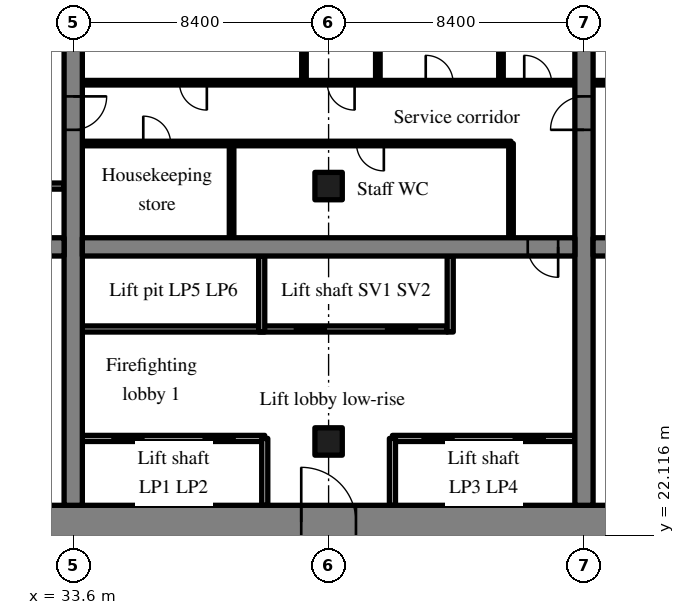
"""IFC4 building model, lengths in metres.
Left out: names, types, materials, properties, quantities, classifications, styles, units other than length and angle.
Written with IfcOpenShell. Run it as: python <this file> out.ifc"""

import sys

from ifc_helpers import new_model, si_unit, direction, frame, frame_2d, origin, origin_2d, place, context, subcontext, project, spatial, rectangle, extrude, source, transform, mapped, element, fill, save


model = new_model("IFC4")
c1 = context("Model", 3, precision=1e-05, world=origin(), true_north=direction((0.0, 1.0)))
c2 = subcontext(c1, "Body", "Model", "MODEL_VIEW")
j1 = project(units=[si_unit("LENGTHUNIT", "METRE"), si_unit("PLANEANGLEUNIT", "RADIAN")], contexts=[c1])
p1 = place(None, origin())
s1 = spatial("IfcSite", under=j1, at=p1, CompositionType="ELEMENT")
p2 = place(p1, origin())
s2 = spatial("IfcBuilding", under=s1, at=p2, CompositionType="ELEMENT")
p3 = place(p2, frame((0.0, 0.0, -4.5)))
s3 = spatial("IfcBuildingStorey", under=s2, at=p3, CompositionType="ELEMENT", Elevation=-4.5)
m1 = source(origin(), c2, "Body", "SweptSolid", [
    extrude(rectangle(XDim=50.4, YDim=1.1, at=frame_2d((25.2, 0.0))), origin(), (0.0, 0.0, 1.0), 4.22),
])
p4 = place(p3, frame((25.2, 22.55, 0.0), z_axis=(0.0, 0.0, 1.0), x_axis=(1.0, 0.0, 0.0)))
e1 = element("IfcWall", 1, at=p4, inside=s3, PredefinedType="SHEAR", context=c2, shape_type="MappedRepresentation", body=[
    mapped(m1, transform((0.0, 0.0, 0.0), scale=1.0)),
])
m2 = source(origin(), c2, "Body", "SweptSolid", [
    extrude(rectangle(XDim=1.8, YDim=2.1, at=frame_2d((0.9, 1.05))), frame((0.0, 0.56, 0.0), z_axis=(0.0, -1.0, 0.0), x_axis=(1.0, 0.0, 0.0)), (0.0, 0.0, 1.0), 1.12),
])
p5 = place(p4, frame((15.9, 0.0, 0.0)))
e2 = element("IfcOpeningElement", 2, at=p5, cuts=e1, PredefinedType="OPENING", context=c2, shape_type="MappedRepresentation", body=[
    mapped(m2, transform((0.0, 0.0, 0.0), scale=1.0)),
])
m3 = source(origin(), c2, "Body", "SweptSolid", [
    extrude(rectangle(XDim=1.2, YDim=2.1, at=frame_2d((0.6, 1.05))), frame((0.0, 0.56, 0.0), z_axis=(0.0, -1.0, 0.0), x_axis=(1.0, 0.0, 0.0)), (0.0, 0.0, 1.0), 1.12),
])
p6 = place(p4, frame((27.0, 0.0, 0.0)))
e3 = element("IfcOpeningElement", 3, at=p6, cuts=e1, PredefinedType="OPENING", context=c2, shape_type="MappedRepresentation", body=[
    mapped(m3, transform((0.0, 0.0, 0.0), scale=1.0)),
])
m4 = source(origin(), c2, "Body", "SweptSolid", [
    extrude(rectangle(XDim=0.9, YDim=2.1, at=frame_2d((0.45, 1.05))), frame((0.0, 0.56, 0.0), z_axis=(0.0, -1.0, 0.0), x_axis=(1.0, 0.0, 0.0)), (0.0, 0.0, 1.0), 1.12),
])
p7 = place(p4, frame((34.5, 0.0, 0.0)))
e4 = element("IfcOpeningElement", 4, at=p7, cuts=e1, PredefinedType="OPENING", context=c2, shape_type="MappedRepresentation", body=[
    mapped(m4, transform((0.0, 0.0, 0.0), scale=1.0)),
])
p8 = place(p4, frame((31.5, 0.0, 0.0)))
e5 = element("IfcOpeningElement", 5, at=p8, cuts=e1, PredefinedType="OPENING", context=c2, shape_type="MappedRepresentation", body=[
    mapped(m4, transform((0.0, 0.0, 0.0), scale=1.0)),
])
p9 = place(p4, frame((39.75, 0.0, 0.0)))
e6 = element("IfcOpeningElement", 6, at=p9, cuts=e1, PredefinedType="OPENING", context=c2, shape_type="MappedRepresentation", body=[
    mapped(m4, transform((0.0, 0.0, 0.0), scale=1.0)),
])
p10 = place(p4, frame((36.75, 0.0, 0.0)))
e7 = element("IfcOpeningElement", 7, at=p10, cuts=e1, PredefinedType="OPENING", context=c2, shape_type="MappedRepresentation", body=[
    mapped(m4, transform((0.0, 0.0, 0.0), scale=1.0)),
])
p11 = place(p4, frame((6.425, 0.0, 0.0)))
e8 = element("IfcOpeningElement", 8, at=p11, cuts=e1, PredefinedType="OPENING", context=c2, shape_type="MappedRepresentation", body=[
    mapped(m3, transform((0.0, 0.0, 0.0), scale=1.0)),
])
p12 = place(p4, frame((47.675, 0.0, 0.0)))
e9 = element("IfcOpeningElement", 9, at=p12, cuts=e1, PredefinedType="OPENING", context=c2, shape_type="MappedRepresentation", body=[
    mapped(m3, transform((0.0, 0.0, 0.0), scale=1.0)),
])
m5 = source(origin(), c2, "Body", "SweptSolid", [
    extrude(rectangle(XDim=17.8, YDim=0.6, at=frame_2d((8.9, 0.0))), origin(), (0.0, 0.0, 1.0), 4.22),
])
p13 = place(p3, frame((33.6, 23.1, 0.0), z_axis=(0.0, 0.0, 1.0), x_axis=(0.0, 1.0, 0.0)))
e10 = element("IfcWall", 10, at=p13, inside=s3, PredefinedType="SHEAR", context=c2, shape_type="MappedRepresentation", body=[
    mapped(m5, transform((0.0, 0.0, 0.0), scale=1.0)),
])
m6 = source(origin(), c2, "Body", "SweptSolid", [
    extrude(rectangle(XDim=1.1, YDim=2.1, at=frame_2d((0.55, 1.05))), frame((0.0, 0.31, 0.0), z_axis=(0.0, -1.0, 0.0), x_axis=(1.0, 0.0, 0.0)), (0.0, 0.0, 1.0), 0.62),
])
p14 = place(p13, frame((12.35, 0.0, 0.0)))
e11 = element("IfcOpeningElement", 11, at=p14, cuts=e10, PredefinedType="OPENING", context=c2, shape_type="MappedRepresentation", body=[
    mapped(m6, transform((0.0, 0.0, 0.0), scale=1.0)),
])
p15 = place(p3, frame((50.4, 23.1, 0.0), z_axis=(0.0, 0.0, 1.0), x_axis=(0.0, 1.0, 0.0)))
e12 = element("IfcWall", 12, at=p15, inside=s3, PredefinedType="SHEAR", context=c2, shape_type="MappedRepresentation", body=[
    mapped(m5, transform((0.0, 0.0, 0.0), scale=1.0)),
])
p16 = place(p15, frame((12.35, 0.0, 0.0)))
e13 = element("IfcOpeningElement", 13, at=p16, cuts=e12, PredefinedType="OPENING", context=c2, shape_type="MappedRepresentation", body=[
    mapped(m6, transform((0.0, 0.0, 0.0), scale=1.0)),
])
m7 = source(origin(), c2, "Body", "SweptSolid", [
    extrude(rectangle(XDim=7.0, YDim=0.6, at=frame_2d((3.5, 0.0))), origin(), (0.0, 0.0, 1.0), 4.22),
])
p17 = place(p3, frame((26.3, 31.6, 0.0), z_axis=(0.0, 0.0, 1.0), x_axis=(1.0, 0.0, 0.0)))
e14 = element("IfcWall", 14, at=p17, inside=s3, PredefinedType="SHEAR", context=c2, shape_type="MappedRepresentation", body=[
    mapped(m7, transform((0.0, 0.0, 0.0), scale=1.0)),
])
p18 = place(p17, frame((5.375, 0.0, 0.0)))
e15 = element("IfcOpeningElement", 15, at=p18, cuts=e14, PredefinedType="OPENING", context=c2, shape_type="MappedRepresentation", body=[
    mapped(m6, transform((0.0, 0.0, 0.0), scale=1.0)),
])
m8 = source(origin(), c2, "Body", "SweptSolid", [
    extrude(rectangle(XDim=16.2, YDim=0.6, at=frame_2d((8.1, 0.0))), origin(), (0.0, 0.0, 1.0), 4.22),
])
p19 = place(p3, frame((33.9, 31.6, 0.0), z_axis=(0.0, 0.0, 1.0), x_axis=(1.0, 0.0, 0.0)))
e16 = element("IfcWall", 16, at=p19, inside=s3, PredefinedType="SHEAR", context=c2, shape_type="MappedRepresentation", body=[
    mapped(m8, transform((0.0, 0.0, 0.0), scale=1.0)),
])
m9 = source(origin(), c2, "Body", "SweptSolid", [
    extrude(rectangle(XDim=1.0, YDim=2.1, at=frame_2d((0.5, 1.05))), frame((0.0, 0.31, 0.0), z_axis=(0.0, -1.0, 0.0), x_axis=(1.0, 0.0, 0.0)), (0.0, 0.0, 1.0), 0.62),
])
p20 = place(p19, frame((14.65, 0.0, 0.0)))
e17 = element("IfcOpeningElement", 17, at=p20, cuts=e16, PredefinedType="OPENING", context=c2, shape_type="MappedRepresentation", body=[
    mapped(m9, transform((0.0, 0.0, 0.0), scale=1.0)),
])
m10 = source(origin(), c2, "Body", "SweptSolid", [
    extrude(rectangle(XDim=16.2, YDim=0.6, at=frame_2d((8.1, 0.0))), origin(), (0.0, 0.0, 1.0), 4.22),
])
p21 = place(p3, frame((50.7, 31.6, 0.0), z_axis=(0.0, 0.0, 1.0), x_axis=(1.0, 0.0, 0.0)))
e18 = element("IfcWall", 18, at=p21, inside=s3, PredefinedType="SHEAR", context=c2, shape_type="MappedRepresentation", body=[
    mapped(m10, transform((0.0, 0.0, 0.0), scale=1.0)),
])
p22 = place(p21, frame((0.55, 0.0, 0.0)))
e19 = element("IfcOpeningElement", 19, at=p22, cuts=e18, PredefinedType="OPENING", context=c2, shape_type="MappedRepresentation", body=[
    mapped(m9, transform((0.0, 0.0, 0.0), scale=1.0)),
])
m11 = source(origin(), c2, "Body", "SweptSolid", [
    extrude(rectangle(XDim=0.9, YDim=0.9, at=origin_2d()), origin(), (0.0, 0.0, 1.0), 4.22),
])
for number, where, z_axis, x_axis in (
    (20, (42.0, 25.2, 0.0), (0.0, 0.0, 1.0), (1.0, 0.0, 0.0)),
    (21, (42.0, 33.6, 0.0), (0.0, 0.0, 1.0), (1.0, 0.0, 0.0)),
):
    element("IfcColumn", number, at=place(p3, frame(where, z_axis=z_axis, x_axis=x_axis)), inside=s3, PredefinedType="COLUMN", context=c2, shape_type="MappedRepresentation", body=[
        mapped(m11, transform((0.0, 0.0, 0.0), scale=1.0)),
    ])
m12 = source(origin(), c2, "Body", "SweptSolid", [
    extrude(rectangle(XDim=6.0, YDim=0.2, at=frame_2d((3.0, 0.0))), origin(), (0.0, 0.0, 1.0), 4.22),
])
p23 = place(p3, frame((33.9, 25.3, 0.0), z_axis=(0.0, 0.0, 1.0), x_axis=(1.0, 0.0, 0.0)))
e22 = element("IfcWall", 22, at=p23, inside=s3, PredefinedType="SOLIDWALL", context=c2, shape_type="MappedRepresentation", body=[
    mapped(m12, transform((0.0, 0.0, 0.0), scale=1.0)),
])
m13 = source(origin(), c2, "Body", "SweptSolid", [
    extrude(rectangle(XDim=1.1, YDim=2.1, at=frame_2d((0.55, 1.05))), frame((0.0, 0.11, 0.0), z_axis=(0.0, -1.0, 0.0), x_axis=(1.0, 0.0, 0.0)), (0.0, 0.0, 1.0), 0.22),
])
p24 = place(p23, frame((0.95, 0.0, 0.0)))
e23 = element("IfcOpeningElement", 23, at=p24, cuts=e22, PredefinedType="OPENING", context=c2, shape_type="MappedRepresentation", body=[
    mapped(m13, transform((0.0, 0.0, 0.0), scale=1.0)),
])
p25 = place(p23, frame((3.95, 0.0, 0.0)))
e24 = element("IfcOpeningElement", 24, at=p25, cuts=e22, PredefinedType="OPENING", context=c2, shape_type="MappedRepresentation", body=[
    mapped(m13, transform((0.0, 0.0, 0.0), scale=1.0)),
])
p26 = place(p3, frame((44.1, 25.3, 0.0), z_axis=(0.0, 0.0, 1.0), x_axis=(1.0, 0.0, 0.0)))
e25 = element("IfcWall", 25, at=p26, inside=s3, PredefinedType="SOLIDWALL", context=c2, shape_type="MappedRepresentation", body=[
    mapped(m12, transform((0.0, 0.0, 0.0), scale=1.0)),
])
p27 = place(p26, frame((0.95, 0.0, 0.0)))
e26 = element("IfcOpeningElement", 26, at=p27, cuts=e25, PredefinedType="OPENING", context=c2, shape_type="MappedRepresentation", body=[
    mapped(m13, transform((0.0, 0.0, 0.0), scale=1.0)),
])
p28 = place(p26, frame((3.95, 0.0, 0.0)))
e27 = element("IfcOpeningElement", 27, at=p28, cuts=e25, PredefinedType="OPENING", context=c2, shape_type="MappedRepresentation", body=[
    mapped(m13, transform((0.0, 0.0, 0.0), scale=1.0)),
])
m14 = source(origin(), c2, "Body", "SweptSolid", [
    extrude(rectangle(XDim=12.0, YDim=0.2, at=frame_2d((6.0, 0.0))), origin(), (0.0, 0.0, 1.0), 4.22),
])
p29 = place(p3, frame((33.9, 28.9, 0.0), z_axis=(0.0, 0.0, 1.0), x_axis=(1.0, 0.0, 0.0)))
e28 = element("IfcWall", 28, at=p29, inside=s3, PredefinedType="SOLIDWALL", context=c2, shape_type="MappedRepresentation", body=[
    mapped(m14, transform((0.0, 0.0, 0.0), scale=1.0)),
])
p30 = place(p29, frame((6.95, 0.0, 0.0)))
e29 = element("IfcOpeningElement", 29, at=p30, cuts=e28, PredefinedType="OPENING", context=c2, shape_type="MappedRepresentation", body=[
    mapped(m13, transform((0.0, 0.0, 0.0), scale=1.0)),
])
p31 = place(p29, frame((9.95, 0.0, 0.0)))
e30 = element("IfcOpeningElement", 30, at=p31, cuts=e28, PredefinedType="OPENING", context=c2, shape_type="MappedRepresentation", body=[
    mapped(m13, transform((0.0, 0.0, 0.0), scale=1.0)),
])
m15 = source(origin(), c2, "Body", "SweptSolid", [
    extrude(rectangle(XDim=2.2, YDim=0.2, at=frame_2d((1.1, 0.0))), origin(), (0.0, 0.0, 1.0), 4.22),
])
for number, where, z_axis, x_axis in (
    (31, (39.9, 23.1, 0.0), (0.0, 0.0, 1.0), (0.0, 1.0, 0.0)),
    (32, (44.1, 23.1, 0.0), (0.0, 0.0, 1.0), (0.0, 1.0, 0.0)),
):
    element("IfcWall", number, at=place(p3, frame(where, z_axis=z_axis, x_axis=x_axis)), inside=s3, PredefinedType="SOLIDWALL", context=c2, shape_type="MappedRepresentation", body=[
        mapped(m15, transform((0.0, 0.0, 0.0), scale=1.0)),
    ])
m16 = source(origin(), c2, "Body", "SweptSolid", [
    extrude(rectangle(XDim=2.5, YDim=0.2, at=frame_2d((1.25, 0.0))), origin(), (0.0, 0.0, 1.0), 4.22),
])
for number, where, z_axis, x_axis in (
    (33, (46.0, 28.8, 0.0), (0.0, 0.0, 1.0), (0.0, 1.0, 0.0)),
    (34, (39.8, 28.8, 0.0), (0.0, 0.0, 1.0), (0.0, 1.0, 0.0)),
):
    element("IfcWall", number, at=place(p3, frame(where, z_axis=z_axis, x_axis=x_axis)), inside=s3, PredefinedType="SOLIDWALL", context=c2, shape_type="MappedRepresentation", body=[
        mapped(m16, transform((0.0, 0.0, 0.0), scale=1.0)),
    ])
m17 = source(origin(), c2, "Body", "SweptSolid", [
    extrude(rectangle(XDim=3.1, YDim=0.15, at=frame_2d((1.55, 0.0))), origin(), (0.0, 0.0, 1.0), 4.22),
])
p32 = place(p3, frame((48.0, 31.9, 0.0), z_axis=(0.0, 0.0, 1.0), x_axis=(0.0, 1.0, 0.0)))
e35 = element("IfcWall", 35, at=p32, inside=s3, PredefinedType="PARTITIONING", context=c2, shape_type="MappedRepresentation", body=[
    mapped(m17, transform((0.0, 0.0, 0.0), scale=1.0)),
])
m18 = source(origin(), c2, "Body", "SweptSolid", [
    extrude(rectangle(XDim=14.1, YDim=0.15, at=frame_2d((7.05, 0.0))), origin(), (0.0, 0.0, 1.0), 4.22),
])
p33 = place(p3, frame((33.9, 35.0, 0.0), z_axis=(0.0, 0.0, 1.0), x_axis=(1.0, 0.0, 0.0)))
e36 = element("IfcWall", 36, at=p33, inside=s3, PredefinedType="PARTITIONING", context=c2, shape_type="MappedRepresentation", body=[
    mapped(m18, transform((0.0, 0.0, 0.0), scale=1.0)),
])
m19 = source(origin(), c2, "Body", "SweptSolid", [
    extrude(rectangle(XDim=0.9, YDim=2.1, at=frame_2d((0.45, 1.05))), frame((0.0, 0.085, 0.0), z_axis=(0.0, -1.0, 0.0), x_axis=(1.0, 0.0, 0.0)), (0.0, 0.0, 1.0), 0.17),
])
p34 = place(p33, frame((2.004, 0.0, 0.0)))
e37 = element("IfcOpeningElement", 37, at=p34, cuts=e36, PredefinedType="OPENING", context=c2, shape_type="MappedRepresentation", body=[
    mapped(m19, transform((0.0, 0.0, 0.0), scale=1.0)),
])
p35 = place(p33, frame((9.017, 0.0, 0.0)))
e38 = element("IfcOpeningElement", 38, at=p35, cuts=e36, PredefinedType="OPENING", context=c2, shape_type="MappedRepresentation", body=[
    mapped(m19, transform((0.0, 0.0, 0.0), scale=1.0)),
])
m20 = source(origin(), c2, "Body", "SweptSolid", [
    extrude(rectangle(XDim=16.2, YDim=0.15, at=frame_2d((8.1, 0.0))), origin(), (0.0, 0.0, 1.0), 4.22),
])
p36 = place(p3, frame((33.9, 37.0, 0.0), z_axis=(0.0, 0.0, 1.0), x_axis=(1.0, 0.0, 0.0)))
e39 = element("IfcWall", 39, at=p36, inside=s3, PredefinedType="PARTITIONING", context=c2, shape_type="MappedRepresentation", body=[
    mapped(m20, transform((0.0, 0.0, 0.0), scale=1.0)),
])
p37 = place(p36, frame((3.195, 0.0, 0.0)))
e40 = element("IfcOpeningElement", 40, at=p37, cuts=e39, PredefinedType="OPENING", context=c2, shape_type="MappedRepresentation", body=[
    mapped(m19, transform((0.0, 0.0, 0.0), scale=1.0)),
])
p38 = place(p36, frame((8.055, 0.0, 0.0)))
e41 = element("IfcOpeningElement", 41, at=p38, cuts=e39, PredefinedType="OPENING", context=c2, shape_type="MappedRepresentation", body=[
    mapped(m19, transform((0.0, 0.0, 0.0), scale=1.0)),
])
p39 = place(p36, frame((11.295, 0.0, 0.0)))
e42 = element("IfcOpeningElement", 42, at=p39, cuts=e39, PredefinedType="OPENING", context=c2, shape_type="MappedRepresentation", body=[
    mapped(m19, transform((0.0, 0.0, 0.0), scale=1.0)),
])
p40 = place(p36, frame((14.535, 0.0, 0.0)))
e43 = element("IfcOpeningElement", 43, at=p40, cuts=e39, PredefinedType="OPENING", context=c2, shape_type="MappedRepresentation", body=[
    mapped(m19, transform((0.0, 0.0, 0.0), scale=1.0)),
])
p41 = place(p3, frame((38.809, 31.9, 0.0), z_axis=(0.0, 0.0, 1.0), x_axis=(0.0, 1.0, 0.0)))
e44 = element("IfcWall", 44, at=p41, inside=s3, PredefinedType="PARTITIONING", context=c2, shape_type="MappedRepresentation", body=[
    mapped(m17, transform((0.0, 0.0, 0.0), scale=1.0)),
])
m21 = source(origin(), c2, "Body", "SweptSolid", [
    extrude(rectangle(XDim=3.9, YDim=0.15, at=frame_2d((1.95, 0.0))), origin(), (0.0, 0.0, 1.0), 4.22),
])
for number, where, z_axis, x_axis in (
    (45, (41.19, 37.0, 0.0), (0.0, 0.0, 1.0), (0.0, 1.0, 0.0)),
    (46, (43.62, 37.0, 0.0), (0.0, 0.0, 1.0), (0.0, 1.0, 0.0)),
    (47, (47.67, 37.0, 0.0), (0.0, 0.0, 1.0), (0.0, 1.0, 0.0)),
):
    element("IfcWall", number, at=place(p3, frame(where, z_axis=z_axis, x_axis=x_axis)), inside=s3, PredefinedType="PARTITIONING", context=c2, shape_type="MappedRepresentation", body=[
        mapped(m21, transform((0.0, 0.0, 0.0), scale=1.0)),
    ])
m22 = source(origin(), c2, "Body", "SweptSolid", [
    extrude(rectangle(XDim=16.2, YDim=0.15, at=frame_2d((8.1, 0.0))), origin(), (0.0, 0.0, 1.0), 4.22),
])
p42 = place(p3, frame((66.9, 37.0, 0.0), z_axis=(0.0, 0.0, 1.0), x_axis=(-1.0, 0.0, 0.0)))
e48 = element("IfcWall", 48, at=p42, inside=s3, PredefinedType="PARTITIONING", context=c2, shape_type="MappedRepresentation", body=[
    mapped(m22, transform((0.0, 0.0, 0.0), scale=1.0)),
])
p43 = place(p42, frame((0.765, 0.0, 0.0)))
e49 = element("IfcOpeningElement", 49, at=p43, cuts=e48, PredefinedType="OPENING", context=c2, shape_type="MappedRepresentation", body=[
    mapped(m19, transform((0.0, 0.0, 0.0), scale=1.0)),
])
p44 = place(p42, frame((3.6, 0.0, 0.0)))
e50 = element("IfcOpeningElement", 50, at=p44, cuts=e48, PredefinedType="OPENING", context=c2, shape_type="MappedRepresentation", body=[
    mapped(m19, transform((0.0, 0.0, 0.0), scale=1.0)),
])
p45 = place(p42, frame((9.27, 0.0, 0.0)))
e51 = element("IfcOpeningElement", 51, at=p45, cuts=e48, PredefinedType="OPENING", context=c2, shape_type="MappedRepresentation", body=[
    mapped(m19, transform((0.0, 0.0, 0.0), scale=1.0)),
])
p46 = place(p42, frame((14.535, 0.0, 0.0)))
e52 = element("IfcOpeningElement", 52, at=p46, cuts=e48, PredefinedType="OPENING", context=c2, shape_type="MappedRepresentation", body=[
    mapped(m19, transform((0.0, 0.0, 0.0), scale=1.0)),
])
m23 = source(origin(), c2, "Body", "SweptSolid", [
    extrude(rectangle(XDim=2.15, YDim=0.2, at=frame_2d((1.075, 0.0))), origin(), (0.0, 0.0, 1.0), 4.22),
])
p47 = place(p3, frame((31.15, 33.6, 0.0), z_axis=(0.0, 0.0, 1.0), x_axis=(1.0, 0.0, 0.0)))
e53 = element("IfcWall", 53, at=p47, inside=s3, PredefinedType="SOLIDWALL", context=c2, shape_type="MappedRepresentation", body=[
    mapped(m23, transform((0.0, 0.0, 0.0), scale=1.0)),
])
m24 = source(origin(), c2, "Body", "SweptSolid", [
    extrude(rectangle(XDim=1.8, YDim=2.1, at=frame_2d((0.9, 1.05))), frame((0.0, 0.325, 0.0), z_axis=(0.0, -1.0, 0.0), x_axis=(1.0, 0.0, 0.0)), (0.0, 0.0, 1.0), 0.05),
])
p48 = place(p5, origin())
e54 = element("IfcDoor", 54, at=p48, inside=s3, OperationType="DOUBLE_DOOR_SINGLE_SWING", PredefinedType="DOOR", context=c2, shape_type="MappedRepresentation", body=[
    mapped(m24, transform((0.0, 0.0, 0.0), scale=1.0)),
])
fill(e2, e54)
m25 = source(origin(), c2, "Body", "SweptSolid", [
    extrude(rectangle(XDim=1.0, YDim=2.1, at=frame_2d((0.5, 1.05))), frame((0.0, 0.025, 0.0), z_axis=(0.0, -1.0, 0.0), x_axis=(1.0, 0.0, 0.0)), (0.0, 0.0, 1.0), 0.05),
])
p49 = place(p20, origin())
e55 = element("IfcDoor", 55, at=p49, inside=s3, OperationType="SINGLE_SWING_RIGHT", PredefinedType="DOOR", context=c2, shape_type="MappedRepresentation", body=[
    mapped(m25, transform((0.0, 0.0, 0.0), scale=1.0)),
])
fill(e17, e55)
m26 = source(origin(), c2, "Body", "SweptSolid", [
    extrude(rectangle(XDim=1.1, YDim=2.1, at=frame_2d((0.55, 1.05))), frame((0.0, 0.025, 0.0), z_axis=(0.0, -1.0, 0.0), x_axis=(1.0, 0.0, 0.0)), (0.0, 0.0, 1.0), 0.05),
])
p50 = place(p24, origin())
e56 = element("IfcDoor", 56, at=p50, inside=s3, OperationType="SLIDING_TO_LEFT", PredefinedType="DOOR", context=c2, shape_type="MappedRepresentation", body=[
    mapped(m26, transform((0.0, 0.0, 0.0), scale=1.0)),
])
fill(e23, e56)
p51 = place(p25, origin())
e57 = element("IfcDoor", 57, at=p51, inside=s3, OperationType="SLIDING_TO_RIGHT", PredefinedType="DOOR", context=c2, shape_type="MappedRepresentation", body=[
    mapped(m26, transform((0.0, 0.0, 0.0), scale=1.0)),
])
fill(e24, e57)
p52 = place(p27, origin())
e58 = element("IfcDoor", 58, at=p52, inside=s3, OperationType="SLIDING_TO_LEFT", PredefinedType="DOOR", context=c2, shape_type="MappedRepresentation", body=[
    mapped(m26, transform((0.0, 0.0, 0.0), scale=1.0)),
])
fill(e26, e58)
p53 = place(p28, origin())
e59 = element("IfcDoor", 59, at=p53, inside=s3, OperationType="SLIDING_TO_RIGHT", PredefinedType="DOOR", context=c2, shape_type="MappedRepresentation", body=[
    mapped(m26, transform((0.0, 0.0, 0.0), scale=1.0)),
])
fill(e27, e59)
p54 = place(p30, origin())
e60 = element("IfcDoor", 60, at=p54, inside=s3, OperationType="SLIDING_TO_LEFT", PredefinedType="DOOR", context=c2, shape_type="MappedRepresentation", body=[
    mapped(m26, transform((0.0, 0.0, 0.0), scale=1.0)),
])
fill(e29, e60)
p55 = place(p31, origin())
e61 = element("IfcDoor", 61, at=p55, inside=s3, OperationType="SLIDING_TO_RIGHT", PredefinedType="DOOR", context=c2, shape_type="MappedRepresentation", body=[
    mapped(m26, transform((0.0, 0.0, 0.0), scale=1.0)),
])
fill(e30, e61)
m27 = source(origin(), c2, "Body", "SweptSolid", [
    extrude(rectangle(XDim=0.9, YDim=2.1, at=frame_2d((0.45, 1.05))), frame((0.0, 0.025, 0.0), z_axis=(0.0, -1.0, 0.0), x_axis=(1.0, 0.0, 0.0)), (0.0, 0.0, 1.0), 0.05),
])
p56 = place(p34, origin())
e62 = element("IfcDoor", 62, at=p56, inside=s3, OperationType="SINGLE_SWING_LEFT", PredefinedType="DOOR", context=c2, shape_type="MappedRepresentation", body=[
    mapped(m27, transform((0.0, 0.0, 0.0), scale=1.0)),
])
fill(e37, e62)
p57 = place(p35, origin())
e63 = element("IfcDoor", 63, at=p57, inside=s3, OperationType="SINGLE_SWING_RIGHT", PredefinedType="DOOR", context=c2, shape_type="MappedRepresentation", body=[
    mapped(m27, transform((0.0, 0.0, 0.0), scale=1.0)),
])
fill(e38, e63)
p58 = place(p37, origin())
e64 = element("IfcDoor", 64, at=p58, inside=s3, OperationType="SINGLE_SWING_RIGHT", PredefinedType="DOOR", context=c2, shape_type="MappedRepresentation", body=[
    mapped(m27, transform((0.0, 0.0, 0.0), scale=1.0)),
])
fill(e40, e64)
p59 = place(p38, origin())
e65 = element("IfcDoor", 65, at=p59, inside=s3, OperationType="SINGLE_SWING_RIGHT", PredefinedType="DOOR", context=c2, shape_type="MappedRepresentation", body=[
    mapped(m27, transform((0.0, 0.0, 0.0), scale=1.0)),
])
fill(e41, e65)
p60 = place(p39, origin())
e66 = element("IfcDoor", 66, at=p60, inside=s3, OperationType="SINGLE_SWING_LEFT", PredefinedType="DOOR", context=c2, shape_type="MappedRepresentation", body=[
    mapped(m27, transform((0.0, 0.0, 0.0), scale=1.0)),
])
fill(e42, e66)
p61 = place(p40, origin())
e67 = element("IfcDoor", 67, at=p61, inside=s3, OperationType="SINGLE_SWING_LEFT", PredefinedType="DOOR", context=c2, shape_type="MappedRepresentation", body=[
    mapped(m27, transform((0.0, 0.0, 0.0), scale=1.0)),
])
fill(e43, e67)
p62 = place(p14, origin())
e68 = element("IfcDoor", 68, at=p62, inside=s3, OperationType="SINGLE_SWING_RIGHT", PredefinedType="DOOR", context=c2, shape_type="MappedRepresentation", body=[
    mapped(m26, transform((0.0, 0.0, 0.0), scale=1.0)),
])
fill(e11, e68)
p63 = place(p16, origin())
e69 = element("IfcDoor", 69, at=p63, inside=s3, OperationType="SINGLE_SWING_LEFT", PredefinedType="DOOR", context=c2, shape_type="MappedRepresentation", body=[
    mapped(m26, transform((0.0, 0.0, 0.0), scale=1.0)),
])
fill(e13, e69)
save(model, sys.argv[1])
